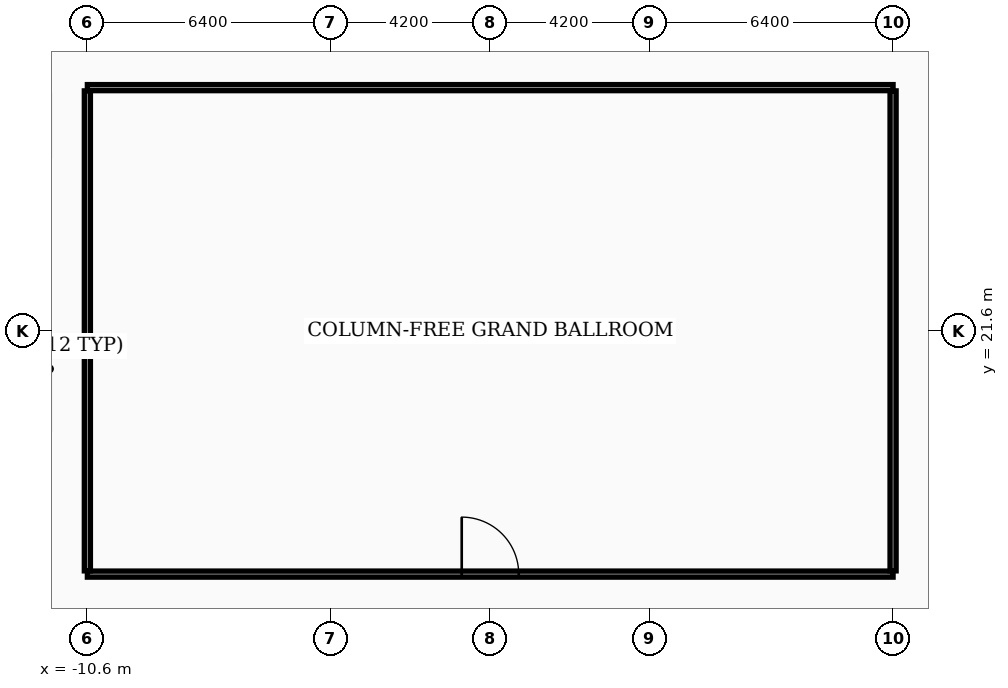
"""IFC4 building model, lengths in metres.
Left out: names, types, materials, properties, quantities, classifications, styles, units other than length and angle.
Written with IfcOpenShell. Run it as: python <this file> out.ifc"""

import sys

from ifc_helpers import new_model, si_unit, direction, frame, frame_2d, origin, place, context, subcontext, project, spatial, rectangle, extrude, element, fill, save


model = new_model("IFC4")
c1 = context("Model", 3, precision=1e-05, world=origin(), true_north=direction((0.0, 1.0)))
c2 = subcontext(c1, "Body", "Model", "MODEL_VIEW")
j1 = project(units=[si_unit("LENGTHUNIT", "METRE"), si_unit("PLANEANGLEUNIT", "RADIAN")], contexts=[c1])
p1 = place(None, origin())
s1 = spatial("IfcSite", under=j1, at=p1, CompositionType="ELEMENT")
p2 = place(p1, origin())
s2 = spatial("IfcBuilding", under=s1, at=p2, CompositionType="ELEMENT")
p3 = place(p2, origin())
s3 = spatial("IfcBuildingStorey", under=s2, at=p3, CompositionType="ELEMENT", Elevation=0.0)
p4 = place(p3, frame((-10.6, 15.2, 0.0), z_axis=(0.0, 0.0, 1.0), x_axis=(1.0, 0.0, 0.0)))
e1 = element("IfcWall", 1, at=p4, inside=s3, PredefinedType="PARTITIONING", context=c2, shape_type="SweptSolid", body=[
    extrude(rectangle(XDim=21.2, YDim=0.16, at=frame_2d((10.6, 0.0))), origin(), (0.0, 0.0, 1.0), 2.67),
])
p5 = place(p4, frame((9.85, 0.0, 0.0)))
e2 = element("IfcOpeningElement", 2, at=p5, cuts=e1, PredefinedType="OPENING", context=c2, shape_type="SweptSolid", body=[
    extrude(rectangle(XDim=1.5, YDim=2.15, at=frame_2d((0.75, 1.075))), frame((0.0, 0.09, 0.0), z_axis=(0.0, -1.0, 0.0), x_axis=(1.0, 0.0, 0.0)), (0.0, 0.0, 1.0), 0.18),
])
p6 = place(p3, frame((-10.6, 28.0, 0.0), z_axis=(0.0, 0.0, 1.0), x_axis=(1.0, 0.0, 0.0)))
e3 = element("IfcWall", 3, at=p6, inside=s3, PredefinedType="PARTITIONING", context=c2, shape_type="SweptSolid", body=[
    extrude(rectangle(XDim=21.2, YDim=0.16, at=frame_2d((10.6, 0.0))), origin(), (0.0, 0.0, 1.0), 2.67),
])
for number, where, z_axis, x_axis in (
    (4, (-10.6, 15.285, 0.0), (0.0, 0.0, 1.0), (0.0, 1.0, 0.0)),
    (5, (10.6, 15.285, 0.0), (0.0, 0.0, 1.0), (0.0, 1.0, 0.0)),
):
    element("IfcWall", number, at=place(p3, frame(where, z_axis=z_axis, x_axis=x_axis)), inside=s3, PredefinedType="PARTITIONING", context=c2, shape_type="SweptSolid", body=[
        extrude(rectangle(XDim=12.63, YDim=0.16, at=frame_2d((6.315, 0.0))), origin(), (0.0, 0.0, 1.0), 2.67),
    ])
p7 = place(p5, origin())
e6 = element("IfcDoor", 6, at=p7, inside=s3, OperationType="DOUBLE_DOOR_SINGLE_SWING", PredefinedType="DOOR", context=c2, shape_type="SweptSolid", body=[
    extrude(rectangle(XDim=1.5, YDim=2.15, at=frame_2d((0.75, 1.075))), frame((0.0, 0.025, 0.0), z_axis=(0.0, -1.0, 0.0), x_axis=(1.0, 0.0, 0.0)), (0.0, 0.0, 1.0), 0.05),
])
fill(e2, e6)
save(model, sys.argv[1])
